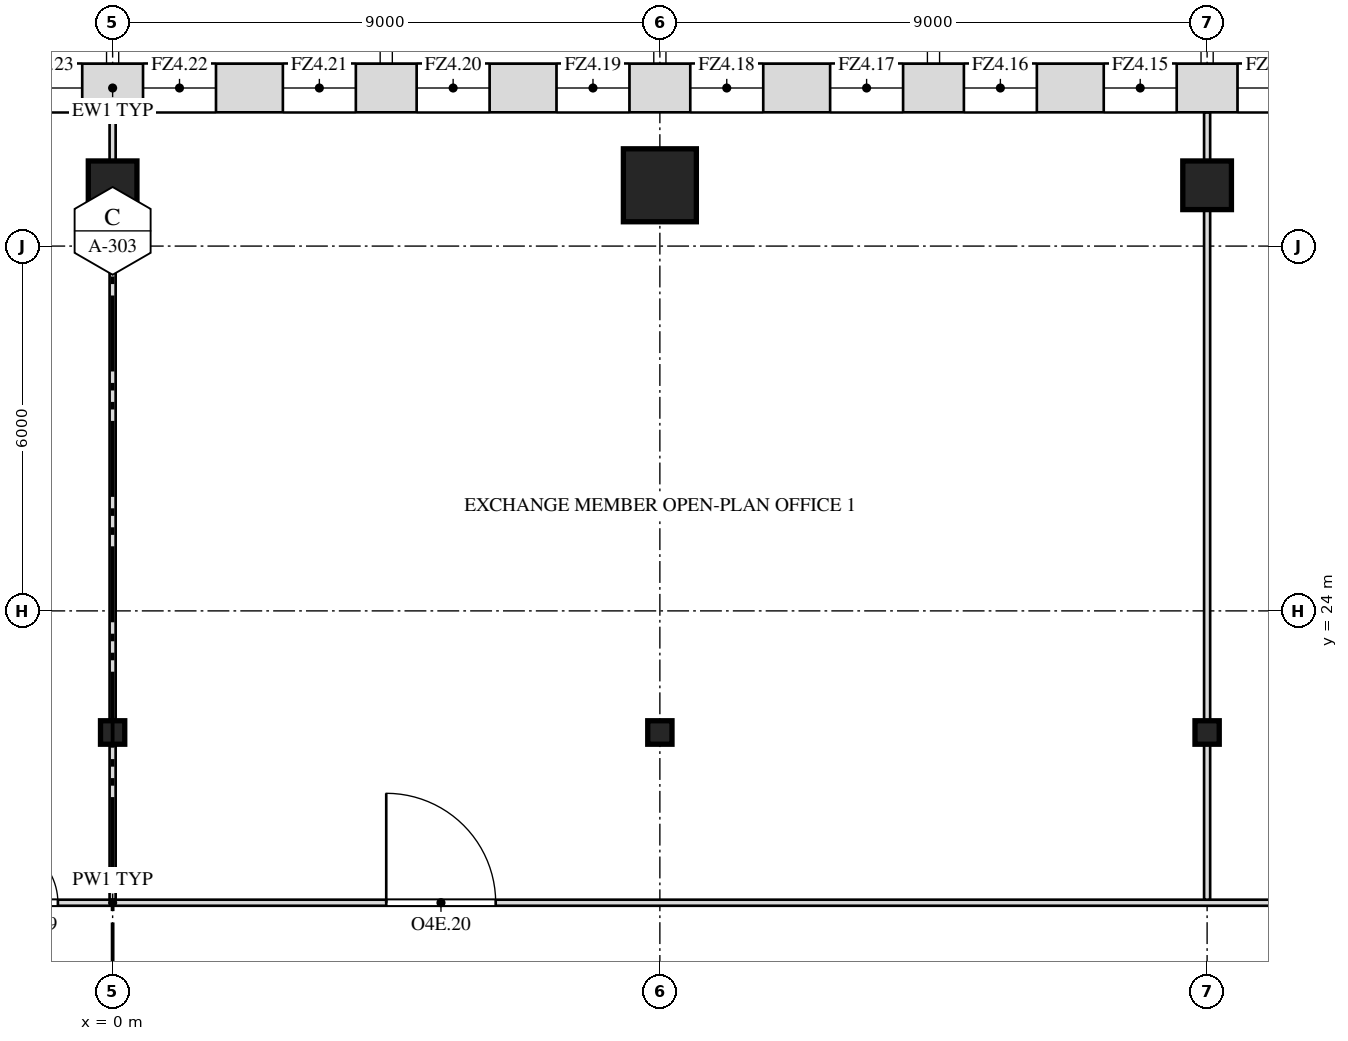
"""IFC4 building model, lengths in metres.
Left out: names, types, materials, properties, quantities, classifications, styles, units other than length and angle.
Written with IfcOpenShell. Run it as: python <this file> out.ifc"""

import sys

from ifc_helpers import new_model, si_unit, direction, frame, frame_2d, origin, origin_2d, place, context, subcontext, project, spatial, rectangle, i_section, extrude, element, fill, save


model = new_model("IFC4")
c1 = context("Model", 3, precision=1e-05, world=origin(), true_north=direction((0.0, 1.0)))
c2 = subcontext(c1, "Body", "Model", "MODEL_VIEW")
j1 = project(units=[si_unit("LENGTHUNIT", "METRE"), si_unit("PLANEANGLEUNIT", "RADIAN")], contexts=[c1])
p1 = place(None, origin())
s1 = spatial("IfcSite", under=j1, at=p1, CompositionType="ELEMENT")
p2 = place(p1, origin())
s2 = spatial("IfcBuilding", under=s1, at=p2, CompositionType="ELEMENT")
p3 = place(p2, frame((0.0, 0.0, 256.5)))
s3 = spatial("IfcBuildingStorey", under=s2, at=p3, CompositionType="ELEMENT", Elevation=256.5)
for number, where, z_axis, x_axis in (
    (1, (0.0, 22.0, 0.0), (0.0, 0.0, 1.0), (1.0, 0.0, 0.0)),
    (2, (9.0, 22.0, 0.0), (0.0, 0.0, 1.0), (1.0, 0.0, 0.0)),
    (3, (18.0, 22.0, 0.0), (0.0, 0.0, 1.0), (1.0, 0.0, 0.0)),
):
    element("IfcColumn", number, at=place(p3, frame(where, z_axis=z_axis, x_axis=x_axis)), inside=s3, PredefinedType="COLUMN", context=c2, shape_type="SweptSolid", body=[
        extrude(i_section(OverallWidth=0.399, OverallDepth=0.386, WebThickness=0.021, FlangeThickness=0.033, at=origin_2d()), origin(), (0.0, 0.0, 1.0), 4.0),
    ])
p4 = place(p3, frame((0.0, 31.0, 0.0), z_axis=(0.0, 0.0, 1.0), x_axis=(1.0, 0.0, 0.0)))
e4 = element("IfcColumn", 4, at=p4, inside=s3, PredefinedType="COLUMN", context=c2, shape_type="SweptSolid", body=[
    extrude(rectangle(XDim=0.8, YDim=0.8, at=origin_2d()), origin(), (0.0, 0.0, 1.0), 4.0),
])
p5 = place(p3, frame((9.0, 31.0, 0.0), z_axis=(0.0, 0.0, 1.0), x_axis=(1.0, 0.0, 0.0)))
e5 = element("IfcColumn", 5, at=p5, inside=s3, PredefinedType="COLUMN", context=c2, shape_type="SweptSolid", body=[
    extrude(rectangle(XDim=1.2, YDim=1.2, at=origin_2d()), origin(), (0.0, 0.0, 1.0), 4.0),
])
p6 = place(p3, frame((18.0, 31.0, 0.0), z_axis=(0.0, 0.0, 1.0), x_axis=(1.0, 0.0, 0.0)))
e6 = element("IfcColumn", 6, at=p6, inside=s3, PredefinedType="COLUMN", context=c2, shape_type="SweptSolid", body=[
    extrude(rectangle(XDim=0.8, YDim=0.8, at=origin_2d()), origin(), (0.0, 0.0, 1.0), 4.0),
])
p7 = place(p3, frame((-35.2, 19.2, 0.0), z_axis=(0.0, 0.0, 1.0), x_axis=(1.0, 0.0, 0.0)))
e7 = element("IfcWall", 7, at=p7, inside=s3, PredefinedType="PARTITIONING", context=c2, shape_type="SweptSolid", body=[
    extrude(rectangle(XDim=70.4, YDim=0.1, at=frame_2d((35.2, 0.0))), origin(), (0.0, 0.0, 1.0), 3.8),
])
p8 = place(p7, frame((10.5, 0.0, 0.0)))
e8 = element("IfcOpeningElement", 8, at=p8, cuts=e7, PredefinedType="OPENING", context=c2, shape_type="SweptSolid", body=[
    extrude(rectangle(XDim=1.8, YDim=2.1, at=frame_2d((0.9, 1.05))), frame((0.0, 0.062, 0.0), z_axis=(0.0, -1.0, 0.0), x_axis=(1.0, 0.0, 0.0)), (0.0, 0.0, 1.0), 0.124),
])
p9 = place(p7, frame((33.3, 0.0, 0.0)))
e9 = element("IfcOpeningElement", 9, at=p9, cuts=e7, PredefinedType="OPENING", context=c2, shape_type="SweptSolid", body=[
    extrude(rectangle(XDim=1.0, YDim=2.1, at=frame_2d((0.5, 1.05))), frame((0.0, 0.062, 0.0), z_axis=(0.0, -1.0, 0.0), x_axis=(1.0, 0.0, 0.0)), (0.0, 0.0, 1.0), 0.124),
])
p10 = place(p7, frame((39.7, 0.0, 0.0)))
e10 = element("IfcOpeningElement", 10, at=p10, cuts=e7, PredefinedType="OPENING", context=c2, shape_type="SweptSolid", body=[
    extrude(rectangle(XDim=1.8, YDim=2.1, at=frame_2d((0.9, 1.05))), frame((0.0, 0.062, 0.0), z_axis=(0.0, -1.0, 0.0), x_axis=(1.0, 0.0, 0.0)), (0.0, 0.0, 1.0), 0.124),
])
p11 = place(p7, frame((60.3, 0.0, 0.0)))
e11 = element("IfcOpeningElement", 11, at=p11, cuts=e7, PredefinedType="OPENING", context=c2, shape_type="SweptSolid", body=[
    extrude(rectangle(XDim=1.0, YDim=2.1, at=frame_2d((0.5, 1.05))), frame((0.0, 0.062, 0.0), z_axis=(0.0, -1.0, 0.0), x_axis=(1.0, 0.0, 0.0)), (0.0, 0.0, 1.0), 0.124),
])
p12 = place(p3, frame((0.0, 19.25, 0.0), z_axis=(0.0, 0.0, 1.0), x_axis=(0.0, 1.0, 0.0)))
e12 = element("IfcWall", 12, at=p12, inside=s3, PredefinedType="PARTITIONING", context=c2, shape_type="SweptSolid", body=[
    extrude(rectangle(XDim=2.557, YDim=0.1, at=frame_2d((1.278, 0.0))), origin(), (0.0, 0.0, 1.0), 3.193),
])
p13 = place(p3, frame((0.0, 22.193, 0.0), z_axis=(0.0, 0.0, 1.0), x_axis=(0.0, 1.0, 0.0)))
e13 = element("IfcWall", 13, at=p13, inside=s3, PredefinedType="PARTITIONING", context=c2, shape_type="SweptSolid", body=[
    extrude(rectangle(XDim=8.407, YDim=0.1, at=frame_2d((4.204, 0.0))), origin(), (0.0, 0.0, 1.0), 3.193),
])
p14 = place(p3, frame((0.0, 31.4, 0.0), z_axis=(0.0, 0.0, 1.0), x_axis=(0.0, 1.0, 0.0)))
e14 = element("IfcWall", 14, at=p14, inside=s3, PredefinedType="PARTITIONING", context=c2, shape_type="SweptSolid", body=[
    extrude(rectangle(XDim=0.8, YDim=0.1, at=frame_2d((0.4, 0.0))), origin(), (0.0, 0.0, 1.0), 3.8),
])
p15 = place(p3, frame((18.0, 19.25, 0.0), z_axis=(0.0, 0.0, 1.0), x_axis=(0.0, 1.0, 0.0)))
e15 = element("IfcWall", 15, at=p15, inside=s3, PredefinedType="PARTITIONING", context=c2, shape_type="SweptSolid", body=[
    extrude(rectangle(XDim=2.557, YDim=0.1, at=frame_2d((1.278, 0.0))), origin(), (0.0, 0.0, 1.0), 3.193),
])
p16 = place(p3, frame((18.0, 22.193, 0.0), z_axis=(0.0, 0.0, 1.0), x_axis=(0.0, 1.0, 0.0)))
e16 = element("IfcWall", 16, at=p16, inside=s3, PredefinedType="PARTITIONING", context=c2, shape_type="SweptSolid", body=[
    extrude(rectangle(XDim=8.407, YDim=0.1, at=frame_2d((4.204, 0.0))), origin(), (0.0, 0.0, 1.0), 3.193),
])
p17 = place(p3, frame((18.0, 31.4, 0.0), z_axis=(0.0, 0.0, 1.0), x_axis=(0.0, 1.0, 0.0)))
e17 = element("IfcWall", 17, at=p17, inside=s3, PredefinedType="PARTITIONING", context=c2, shape_type="SweptSolid", body=[
    extrude(rectangle(XDim=0.8, YDim=0.1, at=frame_2d((0.4, 0.0))), origin(), (0.0, 0.0, 1.0), 3.8),
])
p18 = place(p3, frame((29.948, 32.6, 0.0), z_axis=(0.0, 0.0, 1.0), x_axis=(-1.0, 0.0, 0.0)))
e18 = element("IfcWall", 18, at=p18, inside=s3, PredefinedType="SOLIDWALL", context=c2, shape_type="SweptSolid", body=[
    extrude(rectangle(XDim=59.895, YDim=0.8, at=frame_2d((29.948, 0.0))), origin(), (0.0, 0.0, 1.0), 3.8),
])
p19 = place(p18, frame((3.448, 0.0, 0.8)))
e19 = element("IfcOpeningElement", 19, at=p19, cuts=e18, PredefinedType="OPENING", context=c2, shape_type="SweptSolid", body=[
    extrude(rectangle(XDim=1.2, YDim=2.7, at=frame_2d((0.6, 1.35))), frame((0.0, 0.412, 0.0), z_axis=(0.0, -1.0, 0.0), x_axis=(1.0, 0.0, 0.0)), (0.0, 0.0, 1.0), 0.824),
])
p20 = place(p18, frame((5.748, 0.0, 0.8)))
e20 = element("IfcOpeningElement", 20, at=p20, cuts=e18, PredefinedType="OPENING", context=c2, shape_type="SweptSolid", body=[
    extrude(rectangle(XDim=1.2, YDim=2.7, at=frame_2d((0.6, 1.35))), frame((0.0, 0.412, 0.0), z_axis=(0.0, -1.0, 0.0), x_axis=(1.0, 0.0, 0.0)), (0.0, 0.0, 1.0), 0.824),
])
p21 = place(p18, frame((7.948, 0.0, 0.8)))
e21 = element("IfcOpeningElement", 21, at=p21, cuts=e18, PredefinedType="OPENING", context=c2, shape_type="SweptSolid", body=[
    extrude(rectangle(XDim=1.2, YDim=2.7, at=frame_2d((0.6, 1.35))), frame((0.0, 0.412, 0.0), z_axis=(0.0, -1.0, 0.0), x_axis=(1.0, 0.0, 0.0)), (0.0, 0.0, 1.0), 0.824),
])
p22 = place(p18, frame((10.248, 0.0, 0.8)))
e22 = element("IfcOpeningElement", 22, at=p22, cuts=e18, PredefinedType="OPENING", context=c2, shape_type="SweptSolid", body=[
    extrude(rectangle(XDim=1.2, YDim=2.7, at=frame_2d((0.6, 1.35))), frame((0.0, 0.412, 0.0), z_axis=(0.0, -1.0, 0.0), x_axis=(1.0, 0.0, 0.0)), (0.0, 0.0, 1.0), 0.824),
])
p23 = place(p18, frame((12.448, 0.0, 0.8)))
e23 = element("IfcOpeningElement", 23, at=p23, cuts=e18, PredefinedType="OPENING", context=c2, shape_type="SweptSolid", body=[
    extrude(rectangle(XDim=1.2, YDim=2.7, at=frame_2d((0.6, 1.35))), frame((0.0, 0.412, 0.0), z_axis=(0.0, -1.0, 0.0), x_axis=(1.0, 0.0, 0.0)), (0.0, 0.0, 1.0), 0.824),
])
p24 = place(p18, frame((14.748, 0.0, 0.8)))
e24 = element("IfcOpeningElement", 24, at=p24, cuts=e18, PredefinedType="OPENING", context=c2, shape_type="SweptSolid", body=[
    extrude(rectangle(XDim=1.2, YDim=2.7, at=frame_2d((0.6, 1.35))), frame((0.0, 0.412, 0.0), z_axis=(0.0, -1.0, 0.0), x_axis=(1.0, 0.0, 0.0)), (0.0, 0.0, 1.0), 0.824),
])
p25 = place(p18, frame((16.948, 0.0, 0.8)))
e25 = element("IfcOpeningElement", 25, at=p25, cuts=e18, PredefinedType="OPENING", context=c2, shape_type="SweptSolid", body=[
    extrude(rectangle(XDim=1.2, YDim=2.7, at=frame_2d((0.6, 1.35))), frame((0.0, 0.412, 0.0), z_axis=(0.0, -1.0, 0.0), x_axis=(1.0, 0.0, 0.0)), (0.0, 0.0, 1.0), 0.824),
])
p26 = place(p18, frame((19.248, 0.0, 0.8)))
e26 = element("IfcOpeningElement", 26, at=p26, cuts=e18, PredefinedType="OPENING", context=c2, shape_type="SweptSolid", body=[
    extrude(rectangle(XDim=1.2, YDim=2.7, at=frame_2d((0.6, 1.35))), frame((0.0, 0.412, 0.0), z_axis=(0.0, -1.0, 0.0), x_axis=(1.0, 0.0, 0.0)), (0.0, 0.0, 1.0), 0.824),
])
p27 = place(p18, frame((21.448, 0.0, 0.8)))
e27 = element("IfcOpeningElement", 27, at=p27, cuts=e18, PredefinedType="OPENING", context=c2, shape_type="SweptSolid", body=[
    extrude(rectangle(XDim=1.2, YDim=2.7, at=frame_2d((0.6, 1.35))), frame((0.0, 0.412, 0.0), z_axis=(0.0, -1.0, 0.0), x_axis=(1.0, 0.0, 0.0)), (0.0, 0.0, 1.0), 0.824),
])
p28 = place(p18, frame((23.748, 0.0, 0.8)))
e28 = element("IfcOpeningElement", 28, at=p28, cuts=e18, PredefinedType="OPENING", context=c2, shape_type="SweptSolid", body=[
    extrude(rectangle(XDim=1.2, YDim=2.7, at=frame_2d((0.6, 1.35))), frame((0.0, 0.412, 0.0), z_axis=(0.0, -1.0, 0.0), x_axis=(1.0, 0.0, 0.0)), (0.0, 0.0, 1.0), 0.824),
])
p29 = place(p18, frame((25.948, 0.0, 0.8)))
e29 = element("IfcOpeningElement", 29, at=p29, cuts=e18, PredefinedType="OPENING", context=c2, shape_type="SweptSolid", body=[
    extrude(rectangle(XDim=1.2, YDim=2.7, at=frame_2d((0.6, 1.35))), frame((0.0, 0.412, 0.0), z_axis=(0.0, -1.0, 0.0), x_axis=(1.0, 0.0, 0.0)), (0.0, 0.0, 1.0), 0.824),
])
p30 = place(p18, frame((28.248, 0.0, 0.8)))
e30 = element("IfcOpeningElement", 30, at=p30, cuts=e18, PredefinedType="OPENING", context=c2, shape_type="SweptSolid", body=[
    extrude(rectangle(XDim=1.2, YDim=2.7, at=frame_2d((0.6, 1.35))), frame((0.0, 0.412, 0.0), z_axis=(0.0, -1.0, 0.0), x_axis=(1.0, 0.0, 0.0)), (0.0, 0.0, 1.0), 0.824),
])
p31 = place(p18, frame((30.448, 0.0, 0.8)))
e31 = element("IfcOpeningElement", 31, at=p31, cuts=e18, PredefinedType="OPENING", context=c2, shape_type="SweptSolid", body=[
    extrude(rectangle(XDim=1.2, YDim=2.7, at=frame_2d((0.6, 1.35))), frame((0.0, 0.412, 0.0), z_axis=(0.0, -1.0, 0.0), x_axis=(1.0, 0.0, 0.0)), (0.0, 0.0, 1.0), 0.824),
])
p32 = place(p18, frame((32.748, 0.0, 0.8)))
e32 = element("IfcOpeningElement", 32, at=p32, cuts=e18, PredefinedType="OPENING", context=c2, shape_type="SweptSolid", body=[
    extrude(rectangle(XDim=1.2, YDim=2.7, at=frame_2d((0.6, 1.35))), frame((0.0, 0.412, 0.0), z_axis=(0.0, -1.0, 0.0), x_axis=(1.0, 0.0, 0.0)), (0.0, 0.0, 1.0), 0.824),
])
p33 = place(p18, frame((34.948, 0.0, 0.8)))
e33 = element("IfcOpeningElement", 33, at=p33, cuts=e18, PredefinedType="OPENING", context=c2, shape_type="SweptSolid", body=[
    extrude(rectangle(XDim=1.2, YDim=2.7, at=frame_2d((0.6, 1.35))), frame((0.0, 0.412, 0.0), z_axis=(0.0, -1.0, 0.0), x_axis=(1.0, 0.0, 0.0)), (0.0, 0.0, 1.0), 0.824),
])
p34 = place(p18, frame((37.248, 0.0, 0.8)))
e34 = element("IfcOpeningElement", 34, at=p34, cuts=e18, PredefinedType="OPENING", context=c2, shape_type="SweptSolid", body=[
    extrude(rectangle(XDim=1.2, YDim=2.7, at=frame_2d((0.6, 1.35))), frame((0.0, 0.412, 0.0), z_axis=(0.0, -1.0, 0.0), x_axis=(1.0, 0.0, 0.0)), (0.0, 0.0, 1.0), 0.824),
])
p35 = place(p18, frame((39.448, 0.0, 0.8)))
e35 = element("IfcOpeningElement", 35, at=p35, cuts=e18, PredefinedType="OPENING", context=c2, shape_type="SweptSolid", body=[
    extrude(rectangle(XDim=1.2, YDim=2.7, at=frame_2d((0.6, 1.35))), frame((0.0, 0.412, 0.0), z_axis=(0.0, -1.0, 0.0), x_axis=(1.0, 0.0, 0.0)), (0.0, 0.0, 1.0), 0.824),
])
p36 = place(p18, frame((41.748, 0.0, 0.8)))
e36 = element("IfcOpeningElement", 36, at=p36, cuts=e18, PredefinedType="OPENING", context=c2, shape_type="SweptSolid", body=[
    extrude(rectangle(XDim=1.2, YDim=2.7, at=frame_2d((0.6, 1.35))), frame((0.0, 0.412, 0.0), z_axis=(0.0, -1.0, 0.0), x_axis=(1.0, 0.0, 0.0)), (0.0, 0.0, 1.0), 0.824),
])
p37 = place(p18, frame((43.948, 0.0, 0.8)))
e37 = element("IfcOpeningElement", 37, at=p37, cuts=e18, PredefinedType="OPENING", context=c2, shape_type="SweptSolid", body=[
    extrude(rectangle(XDim=1.2, YDim=2.7, at=frame_2d((0.6, 1.35))), frame((0.0, 0.412, 0.0), z_axis=(0.0, -1.0, 0.0), x_axis=(1.0, 0.0, 0.0)), (0.0, 0.0, 1.0), 0.824),
])
p38 = place(p18, frame((46.248, 0.0, 0.8)))
e38 = element("IfcOpeningElement", 38, at=p38, cuts=e18, PredefinedType="OPENING", context=c2, shape_type="SweptSolid", body=[
    extrude(rectangle(XDim=1.2, YDim=2.7, at=frame_2d((0.6, 1.35))), frame((0.0, 0.412, 0.0), z_axis=(0.0, -1.0, 0.0), x_axis=(1.0, 0.0, 0.0)), (0.0, 0.0, 1.0), 0.824),
])
p39 = place(p18, frame((48.448, 0.0, 0.8)))
e39 = element("IfcOpeningElement", 39, at=p39, cuts=e18, PredefinedType="OPENING", context=c2, shape_type="SweptSolid", body=[
    extrude(rectangle(XDim=1.2, YDim=2.7, at=frame_2d((0.6, 1.35))), frame((0.0, 0.412, 0.0), z_axis=(0.0, -1.0, 0.0), x_axis=(1.0, 0.0, 0.0)), (0.0, 0.0, 1.0), 0.824),
])
p40 = place(p18, frame((50.748, 0.0, 0.8)))
e40 = element("IfcOpeningElement", 40, at=p40, cuts=e18, PredefinedType="OPENING", context=c2, shape_type="SweptSolid", body=[
    extrude(rectangle(XDim=1.2, YDim=2.7, at=frame_2d((0.6, 1.35))), frame((0.0, 0.412, 0.0), z_axis=(0.0, -1.0, 0.0), x_axis=(1.0, 0.0, 0.0)), (0.0, 0.0, 1.0), 0.824),
])
p41 = place(p18, frame((52.948, 0.0, 0.8)))
e41 = element("IfcOpeningElement", 41, at=p41, cuts=e18, PredefinedType="OPENING", context=c2, shape_type="SweptSolid", body=[
    extrude(rectangle(XDim=1.2, YDim=2.7, at=frame_2d((0.6, 1.35))), frame((0.0, 0.412, 0.0), z_axis=(0.0, -1.0, 0.0), x_axis=(1.0, 0.0, 0.0)), (0.0, 0.0, 1.0), 0.824),
])
p42 = place(p18, frame((55.248, 0.0, 0.8)))
e42 = element("IfcOpeningElement", 42, at=p42, cuts=e18, PredefinedType="OPENING", context=c2, shape_type="SweptSolid", body=[
    extrude(rectangle(XDim=1.2, YDim=2.7, at=frame_2d((0.6, 1.35))), frame((0.0, 0.412, 0.0), z_axis=(0.0, -1.0, 0.0), x_axis=(1.0, 0.0, 0.0)), (0.0, 0.0, 1.0), 0.824),
])
p43 = place(p9, origin())
e43 = element("IfcDoor", 43, at=p43, inside=s3, OperationType="SINGLE_SWING_LEFT", PredefinedType="DOOR", context=c2, shape_type="SweptSolid", body=[
    extrude(rectangle(XDim=1.0, YDim=2.1, at=frame_2d((0.5, 1.05))), frame((0.0, 0.025, 0.0), z_axis=(0.0, -1.0, 0.0), x_axis=(1.0, 0.0, 0.0)), (0.0, 0.0, 1.0), 0.05),
])
fill(e9, e43)
p44 = place(p10, origin())
e44 = element("IfcDoor", 44, at=p44, inside=s3, OperationType="DOUBLE_DOOR_SINGLE_SWING", PredefinedType="DOOR", context=c2, shape_type="SweptSolid", body=[
    extrude(rectangle(XDim=1.8, YDim=2.1, at=frame_2d((0.9, 1.05))), frame((0.0, 0.025, 0.0), z_axis=(0.0, -1.0, 0.0), x_axis=(1.0, 0.0, 0.0)), (0.0, 0.0, 1.0), 0.05),
])
fill(e10, e44)
p45 = place(p22, origin())
e45 = element("IfcWindow", 45, at=p45, inside=s3, PartitioningType="SINGLE_PANEL", PredefinedType="WINDOW", context=c2, shape_type="SweptSolid", body=[
    extrude(rectangle(XDim=1.2, YDim=2.7, at=frame_2d((0.6, 1.35))), frame((0.0, 0.03, 0.0), z_axis=(0.0, -1.0, 0.0), x_axis=(1.0, 0.0, 0.0)), (0.0, 0.0, 1.0), 0.06),
])
fill(e22, e45)
p46 = place(p23, origin())
e46 = element("IfcWindow", 46, at=p46, inside=s3, PartitioningType="SINGLE_PANEL", PredefinedType="WINDOW", context=c2, shape_type="SweptSolid", body=[
    extrude(rectangle(XDim=1.2, YDim=2.7, at=frame_2d((0.6, 1.35))), frame((0.0, 0.03, 0.0), z_axis=(0.0, -1.0, 0.0), x_axis=(1.0, 0.0, 0.0)), (0.0, 0.0, 1.0), 0.06),
])
fill(e23, e46)
p47 = place(p24, origin())
e47 = element("IfcWindow", 47, at=p47, inside=s3, PartitioningType="SINGLE_PANEL", PredefinedType="WINDOW", context=c2, shape_type="SweptSolid", body=[
    extrude(rectangle(XDim=1.2, YDim=2.7, at=frame_2d((0.6, 1.35))), frame((0.0, 0.03, 0.0), z_axis=(0.0, -1.0, 0.0), x_axis=(1.0, 0.0, 0.0)), (0.0, 0.0, 1.0), 0.06),
])
fill(e24, e47)
p48 = place(p25, origin())
e48 = element("IfcWindow", 48, at=p48, inside=s3, PartitioningType="SINGLE_PANEL", PredefinedType="WINDOW", context=c2, shape_type="SweptSolid", body=[
    extrude(rectangle(XDim=1.2, YDim=2.7, at=frame_2d((0.6, 1.35))), frame((0.0, 0.03, 0.0), z_axis=(0.0, -1.0, 0.0), x_axis=(1.0, 0.0, 0.0)), (0.0, 0.0, 1.0), 0.06),
])
fill(e25, e48)
p49 = place(p26, origin())
e49 = element("IfcWindow", 49, at=p49, inside=s3, PartitioningType="SINGLE_PANEL", PredefinedType="WINDOW", context=c2, shape_type="SweptSolid", body=[
    extrude(rectangle(XDim=1.2, YDim=2.7, at=frame_2d((0.6, 1.35))), frame((0.0, 0.03, 0.0), z_axis=(0.0, -1.0, 0.0), x_axis=(1.0, 0.0, 0.0)), (0.0, 0.0, 1.0), 0.06),
])
fill(e26, e49)
p50 = place(p27, origin())
e50 = element("IfcWindow", 50, at=p50, inside=s3, PartitioningType="SINGLE_PANEL", PredefinedType="WINDOW", context=c2, shape_type="SweptSolid", body=[
    extrude(rectangle(XDim=1.2, YDim=2.7, at=frame_2d((0.6, 1.35))), frame((0.0, 0.03, 0.0), z_axis=(0.0, -1.0, 0.0), x_axis=(1.0, 0.0, 0.0)), (0.0, 0.0, 1.0), 0.06),
])
fill(e27, e50)
p51 = place(p28, origin())
e51 = element("IfcWindow", 51, at=p51, inside=s3, PartitioningType="SINGLE_PANEL", PredefinedType="WINDOW", context=c2, shape_type="SweptSolid", body=[
    extrude(rectangle(XDim=1.2, YDim=2.7, at=frame_2d((0.6, 1.35))), frame((0.0, 0.03, 0.0), z_axis=(0.0, -1.0, 0.0), x_axis=(1.0, 0.0, 0.0)), (0.0, 0.0, 1.0), 0.06),
])
fill(e28, e51)
p52 = place(p29, origin())
e52 = element("IfcWindow", 52, at=p52, inside=s3, PartitioningType="SINGLE_PANEL", PredefinedType="WINDOW", context=c2, shape_type="SweptSolid", body=[
    extrude(rectangle(XDim=1.2, YDim=2.7, at=frame_2d((0.6, 1.35))), frame((0.0, 0.03, 0.0), z_axis=(0.0, -1.0, 0.0), x_axis=(1.0, 0.0, 0.0)), (0.0, 0.0, 1.0), 0.06),
])
fill(e29, e52)
p53 = place(p30, origin())
e53 = element("IfcWindow", 53, at=p53, inside=s3, PartitioningType="SINGLE_PANEL", PredefinedType="WINDOW", context=c2, shape_type="SweptSolid", body=[
    extrude(rectangle(XDim=1.2, YDim=2.7, at=frame_2d((0.6, 1.35))), frame((0.0, 0.03, 0.0), z_axis=(0.0, -1.0, 0.0), x_axis=(1.0, 0.0, 0.0)), (0.0, 0.0, 1.0), 0.06),
])
fill(e30, e53)
p54 = place(p31, origin())
e54 = element("IfcWindow", 54, at=p54, inside=s3, PartitioningType="SINGLE_PANEL", PredefinedType="WINDOW", context=c2, shape_type="SweptSolid", body=[
    extrude(rectangle(XDim=1.2, YDim=2.7, at=frame_2d((0.6, 1.35))), frame((0.0, 0.03, 0.0), z_axis=(0.0, -1.0, 0.0), x_axis=(1.0, 0.0, 0.0)), (0.0, 0.0, 1.0), 0.06),
])
fill(e31, e54)
save(model, sys.argv[1])
